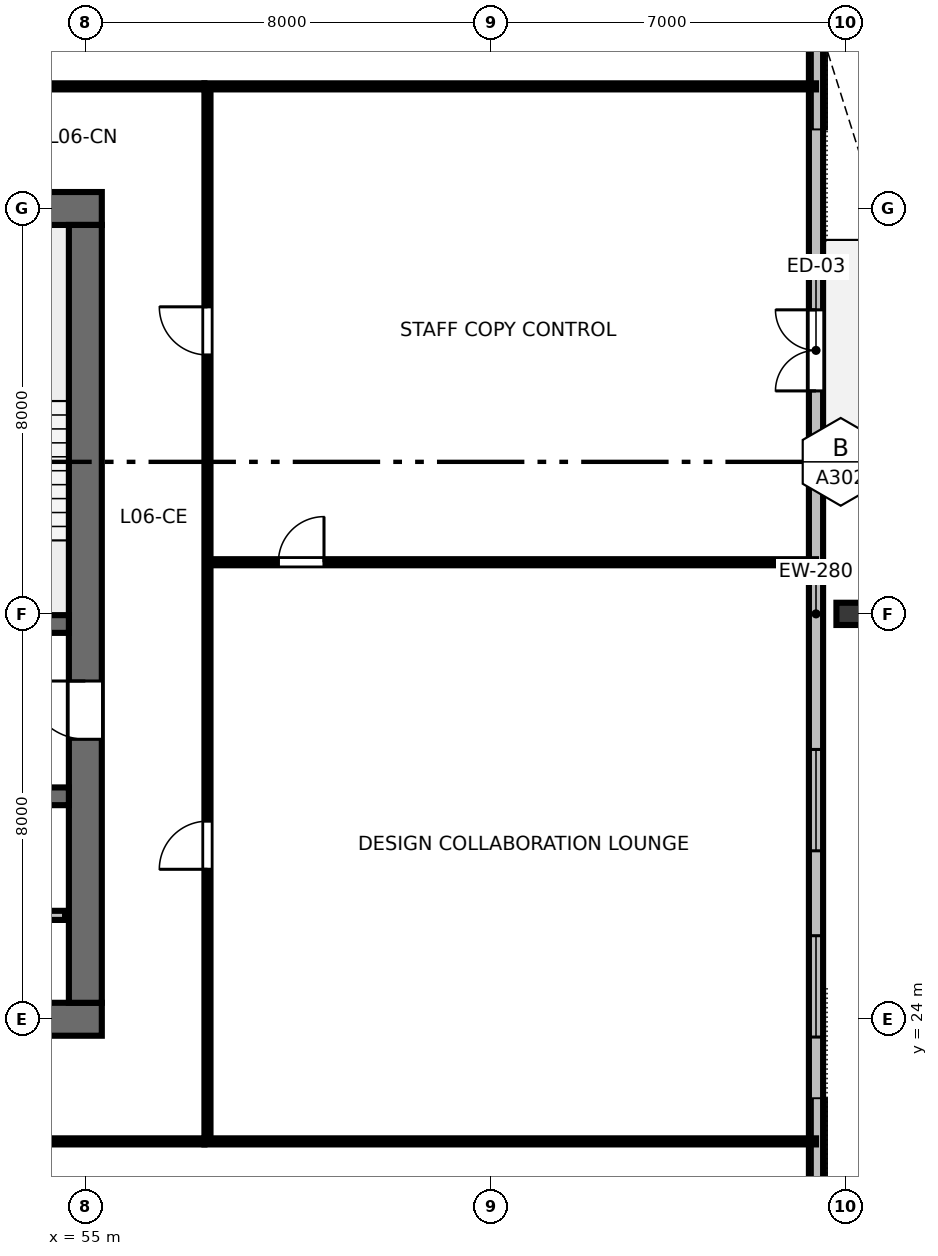
"""IFC4 building model, lengths in metres.
Left out: names, types, materials, properties, quantities, classifications, styles, units other than length and angle.
Written with IfcOpenShell. Run it as: python <this file> out.ifc"""

import sys

from ifc_helpers import new_model, si_unit, direction, frame, frame_2d, origin, origin_2d, place, context, subcontext, project, spatial, rectangle, i_section, extrude, element, fill, save


model = new_model("IFC4")
c1 = context("Model", 3, precision=1e-05, world=origin(), true_north=direction((0.0, 1.0)))
c2 = subcontext(c1, "Body", "Model", "MODEL_VIEW")
j1 = project(units=[si_unit("LENGTHUNIT", "METRE"), si_unit("PLANEANGLEUNIT", "RADIAN")], contexts=[c1])
p1 = place(None, origin())
s1 = spatial("IfcSite", under=j1, at=p1, CompositionType="ELEMENT")
p2 = place(p1, origin())
s2 = spatial("IfcBuilding", under=s1, at=p2, CompositionType="ELEMENT")
p3 = place(p2, frame((0.0, 0.0, 28.0)))
s3 = spatial("IfcBuildingStorey", under=s2, at=p3, CompositionType="ELEMENT", Elevation=28.0)
p4 = place(p3, frame((36.675, 24.0, 0.0), z_axis=(0.0, 0.0, 1.0), x_axis=(1.0, 0.0, 0.0)))
e1 = element("IfcWall", 1, at=p4, inside=s3, PredefinedType="SHEAR", context=c2, shape_type="SweptSolid", body=[
    extrude(rectangle(XDim=18.65, YDim=0.65, at=frame_2d((9.325, 0.0))), origin(), (0.0, 0.0, 1.0), 3.36),
])
p5 = place(p4, frame((5.725, 0.0, 0.0)))
e2 = element("IfcOpeningElement", 2, at=p5, cuts=e1, PredefinedType="OPENING", context=c2, shape_type="SweptSolid", body=[
    extrude(rectangle(XDim=1.6, YDim=2.15, at=frame_2d((0.8, 1.075))), frame((0.0, 0.335, 0.0), z_axis=(0.0, -1.0, 0.0), x_axis=(1.0, 0.0, 0.0)), (0.0, 0.0, 1.0), 0.67),
])
p6 = place(p4, frame((12.125, 0.0, 0.0)))
e3 = element("IfcOpeningElement", 3, at=p6, cuts=e1, PredefinedType="OPENING", context=c2, shape_type="SweptSolid", body=[
    extrude(rectangle(XDim=1.6, YDim=2.15, at=frame_2d((0.8, 1.075))), frame((0.0, 0.335, 0.0), z_axis=(0.0, -1.0, 0.0), x_axis=(1.0, 0.0, 0.0)), (0.0, 0.0, 1.0), 0.67),
])
p7 = place(p3, frame((36.675, 40.0, 0.0), z_axis=(0.0, 0.0, 1.0), x_axis=(1.0, 0.0, 0.0)))
e4 = element("IfcWall", 4, at=p7, inside=s3, PredefinedType="SHEAR", context=c2, shape_type="SweptSolid", body=[
    extrude(rectangle(XDim=18.65, YDim=0.65, at=frame_2d((9.325, 0.0))), origin(), (0.0, 0.0, 1.0), 3.36),
])
p8 = place(p7, frame((8.825, 0.0, 0.0)))
e5 = element("IfcOpeningElement", 5, at=p8, cuts=e4, PredefinedType="OPENING", context=c2, shape_type="SweptSolid", body=[
    extrude(rectangle(XDim=1.0, YDim=2.15, at=frame_2d((0.5, 1.075))), frame((0.0, 0.335, 0.0), z_axis=(0.0, -1.0, 0.0), x_axis=(1.0, 0.0, 0.0)), (0.0, 0.0, 1.0), 0.67),
])
p9 = place(p3, frame((55.0, 24.325, 0.0), z_axis=(0.0, 0.0, 1.0), x_axis=(0.0, 1.0, 0.0)))
e6 = element("IfcWall", 6, at=p9, inside=s3, PredefinedType="SHEAR", context=c2, shape_type="SweptSolid", body=[
    extrude(rectangle(XDim=15.35, YDim=0.65, at=frame_2d((7.675, 0.0))), origin(), (0.0, 0.0, 1.0), 3.36),
])
p10 = place(p9, frame((5.2, 0.0, 0.0)))
e7 = element("IfcOpeningElement", 7, at=p10, cuts=e6, PredefinedType="OPENING", context=c2, shape_type="SweptSolid", body=[
    extrude(rectangle(XDim=1.15, YDim=2.15, at=frame_2d((0.575, 1.075))), frame((0.0, 0.335, 0.0), z_axis=(0.0, -1.0, 0.0), x_axis=(1.0, 0.0, 0.0)), (0.0, 0.0, 1.0), 0.67),
])
p11 = place(p3, frame((37.325, 31.8, 0.0), z_axis=(0.0, 0.0, 1.0), x_axis=(1.0, 0.0, 0.0)))
e8 = element("IfcWall", 8, at=p11, inside=s3, PredefinedType="SHEAR", context=c2, shape_type="SweptSolid", body=[
    extrude(rectangle(XDim=17.35, YDim=0.35, at=frame_2d((8.675, 0.0))), origin(), (0.0, 0.0, 1.0), 3.36),
])
p12 = place(p11, frame((0.725, 0.0, 0.0)))
e9 = element("IfcOpeningElement", 9, at=p12, cuts=e8, PredefinedType="OPENING", context=c2, shape_type="SweptSolid", body=[
    extrude(rectangle(XDim=1.1, YDim=2.15, at=frame_2d((0.55, 1.075))), frame((0.0, 0.185, 0.0), z_axis=(0.0, -1.0, 0.0), x_axis=(1.0, 0.0, 0.0)), (0.0, 0.0, 1.0), 0.37),
])
p13 = place(p11, frame((14.625, 0.0, 0.0)))
e10 = element("IfcOpeningElement", 10, at=p13, cuts=e8, PredefinedType="OPENING", context=c2, shape_type="SweptSolid", body=[
    extrude(rectangle(XDim=1.1, YDim=2.15, at=frame_2d((0.55, 1.075))), frame((0.0, 0.185, 0.0), z_axis=(0.0, -1.0, 0.0), x_axis=(1.0, 0.0, 0.0)), (0.0, 0.0, 1.0), 0.37),
])
p14 = place(p3, frame((37.325, 28.4, 0.0), z_axis=(0.0, 0.0, 1.0), x_axis=(1.0, 0.0, 0.0)))
e11 = element("IfcWall", 11, at=p14, inside=s3, PredefinedType="SHEAR", context=c2, shape_type="SweptSolid", body=[
    extrude(rectangle(XDim=17.35, YDim=0.35, at=frame_2d((8.675, 0.0))), origin(), (0.0, 0.0, 1.0), 3.36),
])
p15 = place(p3, frame((70.08, 32.0, 0.0), z_axis=(0.0, 0.0, 1.0), x_axis=(0.0, 1.0, 0.0)))
e12 = element("IfcColumn", 12, at=p15, inside=s3, PredefinedType="COLUMN", context=c2, shape_type="SweptSolid", body=[
    extrude(i_section(OverallWidth=0.439, OverallDepth=0.514, WebThickness=0.06, FlangeThickness=0.097, FilletRadius=0.025, at=origin_2d()), origin(), (0.0, 0.0, 1.0), 3.358),
])
p16 = place(p3, frame((69.42, 14.36, 0.0), z_axis=(0.0, 0.0, 1.0), x_axis=(0.0, 1.0, 0.0)))
e13 = element("IfcWall", 13, at=p16, inside=s3, PredefinedType="STANDARD", context=c2, shape_type="SweptSolid", body=[
    extrude(rectangle(XDim=35.28, YDim=0.28, at=frame_2d((17.64, 0.0))), origin(), (0.0, 0.0, 1.0), 3.36),
])
p17 = place(p16, frame((22.04, 0.0, 0.0)))
e14 = element("IfcOpeningElement", 14, at=p17, cuts=e13, PredefinedType="OPENING", context=c2, shape_type="SweptSolid", body=[
    extrude(rectangle(XDim=1.6, YDim=2.15, at=frame_2d((0.8, 1.075))), frame((0.0, 0.15, 0.0), z_axis=(0.0, -1.0, 0.0), x_axis=(1.0, 0.0, 0.0)), (0.0, 0.0, 1.0), 0.3),
])
p18 = place(p16, frame((1.938, 0.0, 0.8)))
e15 = element("IfcOpeningElement", 15, at=p18, cuts=e13, PredefinedType="OPENING", context=c2, shape_type="SweptSolid", body=[
    extrude(rectangle(XDim=2.0, YDim=1.95, at=frame_2d((1.0, 0.975))), frame((0.0, 0.15, 0.0), z_axis=(0.0, -1.0, 0.0), x_axis=(1.0, 0.0, 0.0)), (0.0, 0.0, 1.0), 0.3),
])
p19 = place(p16, frame((9.289, 0.0, 0.8)))
e16 = element("IfcOpeningElement", 16, at=p19, cuts=e13, PredefinedType="OPENING", context=c2, shape_type="SweptSolid", body=[
    extrude(rectangle(XDim=2.0, YDim=1.95, at=frame_2d((1.0, 0.975))), frame((0.0, 0.15, 0.0), z_axis=(0.0, -1.0, 0.0), x_axis=(1.0, 0.0, 0.0)), (0.0, 0.0, 1.0), 0.3),
])
p20 = place(p16, frame((12.964, 0.0, 0.8)))
e17 = element("IfcOpeningElement", 17, at=p20, cuts=e13, PredefinedType="OPENING", context=c2, shape_type="SweptSolid", body=[
    extrude(rectangle(XDim=2.0, YDim=1.95, at=frame_2d((1.0, 0.975))), frame((0.0, 0.15, 0.0), z_axis=(0.0, -1.0, 0.0), x_axis=(1.0, 0.0, 0.0)), (0.0, 0.0, 1.0), 0.3),
])
p21 = place(p16, frame((31.342, 0.0, 0.8)))
e18 = element("IfcOpeningElement", 18, at=p21, cuts=e13, PredefinedType="OPENING", context=c2, shape_type="SweptSolid", body=[
    extrude(rectangle(XDim=2.0, YDim=1.95, at=frame_2d((1.0, 0.975))), frame((0.0, 0.15, 0.0), z_axis=(0.0, -1.0, 0.0), x_axis=(1.0, 0.0, 0.0)), (0.0, 0.0, 1.0), 0.3),
])
p22 = place(p3, frame((37.4, 26.05, 0.0), z_axis=(0.0, 0.0, 1.0), x_axis=(1.0, 0.0, 0.0)))
e19 = element("IfcWall", 19, at=p22, inside=s3, PredefinedType="PARTITIONING", context=c2, shape_type="SweptSolid", body=[
    extrude(rectangle(XDim=17.2, YDim=0.18, at=frame_2d((8.6, 0.0))), origin(), (0.0, 0.0, 1.0), 3.36),
])
p23 = place(p22, frame((1.1, 0.0, 0.0)))
e20 = element("IfcOpeningElement", 20, at=p23, cuts=e19, PredefinedType="OPENING", context=c2, shape_type="SweptSolid", body=[
    extrude(rectangle(XDim=1.05, YDim=2.15, at=frame_2d((0.525, 1.075))), frame((0.0, 0.1, 0.0), z_axis=(0.0, -1.0, 0.0), x_axis=(1.0, 0.0, 0.0)), (0.0, 0.0, 1.0), 0.2),
])
p24 = place(p22, frame((3.0, 0.0, 0.0)))
e21 = element("IfcOpeningElement", 21, at=p24, cuts=e19, PredefinedType="OPENING", context=c2, shape_type="SweptSolid", body=[
    extrude(rectangle(XDim=1.05, YDim=2.15, at=frame_2d((0.525, 1.075))), frame((0.0, 0.1, 0.0), z_axis=(0.0, -1.0, 0.0), x_axis=(1.0, 0.0, 0.0)), (0.0, 0.0, 1.0), 0.2),
])
p25 = place(p3, frame((34.65, 21.59, 0.0), z_axis=(0.0, 0.0, 1.0), x_axis=(1.0, 0.0, 0.0)))
e22 = element("IfcWall", 22, at=p25, inside=s3, PredefinedType="PARTITIONING", context=c2, shape_type="SweptSolid", body=[
    extrude(rectangle(XDim=22.7, YDim=0.12, at=frame_2d((11.35, 0.0))), origin(), (0.0, 0.0, 1.0), 2.64),
])
p26 = place(p25, frame((2.224, 0.0, 0.0)))
e23 = element("IfcOpeningElement", 23, at=p26, cuts=e22, PredefinedType="OPENING", context=c2, shape_type="SweptSolid", body=[
    extrude(rectangle(XDim=0.95, YDim=2.15, at=frame_2d((0.475, 1.075))), frame((0.0, 0.07, 0.0), z_axis=(0.0, -1.0, 0.0), x_axis=(1.0, 0.0, 0.0)), (0.0, 0.0, 1.0), 0.14),
])
p27 = place(p25, frame((9.381, 0.0, 0.0)))
e24 = element("IfcOpeningElement", 24, at=p27, cuts=e22, PredefinedType="OPENING", context=c2, shape_type="SweptSolid", body=[
    extrude(rectangle(XDim=0.95, YDim=2.15, at=frame_2d((0.475, 1.075))), frame((0.0, 0.07, 0.0), z_axis=(0.0, -1.0, 0.0), x_axis=(1.0, 0.0, 0.0)), (0.0, 0.0, 1.0), 0.14),
])
p28 = place(p25, frame((18.031, 0.0, 0.0)))
e25 = element("IfcOpeningElement", 25, at=p28, cuts=e22, PredefinedType="OPENING", context=c2, shape_type="SweptSolid", body=[
    extrude(rectangle(XDim=0.95, YDim=2.15, at=frame_2d((0.475, 1.075))), frame((0.0, 0.07, 0.0), z_axis=(0.0, -1.0, 0.0), x_axis=(1.0, 0.0, 0.0)), (0.0, 0.0, 1.0), 0.14),
])
p29 = place(p3, frame((34.65, 42.41, 0.0), z_axis=(0.0, 0.0, 1.0), x_axis=(1.0, 0.0, 0.0)))
e26 = element("IfcWall", 26, at=p29, inside=s3, PredefinedType="PARTITIONING", context=c2, shape_type="SweptSolid", body=[
    extrude(rectangle(XDim=22.7, YDim=0.12, at=frame_2d((11.35, 0.0))), origin(), (0.0, 0.0, 1.0), 2.64),
])
p30 = place(p29, frame((3.981, 0.0, 0.0)))
e27 = element("IfcOpeningElement", 27, at=p30, cuts=e26, PredefinedType="OPENING", context=c2, shape_type="SweptSolid", body=[
    extrude(rectangle(XDim=0.95, YDim=2.15, at=frame_2d((0.475, 1.075))), frame((0.0, 0.07, 0.0), z_axis=(0.0, -1.0, 0.0), x_axis=(1.0, 0.0, 0.0)), (0.0, 0.0, 1.0), 0.14),
])
p31 = place(p29, frame((10.508, 0.0, 0.0)))
e28 = element("IfcOpeningElement", 28, at=p31, cuts=e26, PredefinedType="OPENING", context=c2, shape_type="SweptSolid", body=[
    extrude(rectangle(XDim=0.95, YDim=2.15, at=frame_2d((0.475, 1.075))), frame((0.0, 0.07, 0.0), z_axis=(0.0, -1.0, 0.0), x_axis=(1.0, 0.0, 0.0)), (0.0, 0.0, 1.0), 0.14),
])
p32 = place(p29, frame((17.402, 0.0, 0.0)))
e29 = element("IfcOpeningElement", 29, at=p32, cuts=e26, PredefinedType="OPENING", context=c2, shape_type="SweptSolid", body=[
    extrude(rectangle(XDim=0.95, YDim=2.15, at=frame_2d((0.475, 1.075))), frame((0.0, 0.07, 0.0), z_axis=(0.0, -1.0, 0.0), x_axis=(1.0, 0.0, 0.0)), (0.0, 0.0, 1.0), 0.14),
])
p33 = place(p3, frame((57.41, 33.019, 0.0), z_axis=(0.0, 0.0, 1.0), x_axis=(1.0, 0.0, 0.0)))
e30 = element("IfcWall", 30, at=p33, inside=s3, PredefinedType="PARTITIONING", context=c2, shape_type="SweptSolid", body=[
    extrude(rectangle(XDim=12.01, YDim=0.12, at=frame_2d((6.005, 0.0))), origin(), (0.0, 0.0, 1.0), 2.64),
])
p34 = place(p33, frame((1.4, 0.0, 0.0)))
e31 = element("IfcOpeningElement", 31, at=p34, cuts=e30, PredefinedType="OPENING", context=c2, shape_type="SweptSolid", body=[
    extrude(rectangle(XDim=0.9, YDim=2.15, at=frame_2d((0.45, 1.075))), frame((0.0, 0.07, 0.0), z_axis=(0.0, -1.0, 0.0), x_axis=(1.0, 0.0, 0.0)), (0.0, 0.0, 1.0), 0.14),
])
p35 = place(p3, frame((57.41, 21.65, 0.0), z_axis=(0.0, 0.0, 1.0), x_axis=(0.0, 1.0, 0.0)))
e32 = element("IfcWall", 32, at=p35, inside=s3, PredefinedType="PARTITIONING", context=c2, shape_type="SweptSolid", body=[
    extrude(rectangle(XDim=20.7, YDim=0.12, at=frame_2d((10.35, 0.0))), origin(), (0.0, 0.0, 1.0), 2.64),
])
p36 = place(p35, frame((5.31, 0.0, 0.0)))
e33 = element("IfcOpeningElement", 33, at=p36, cuts=e32, PredefinedType="OPENING", context=c2, shape_type="SweptSolid", body=[
    extrude(rectangle(XDim=0.95, YDim=2.15, at=frame_2d((0.475, 1.075))), frame((0.0, 0.07, 0.0), z_axis=(0.0, -1.0, 0.0), x_axis=(1.0, 0.0, 0.0)), (0.0, 0.0, 1.0), 0.14),
])
p37 = place(p35, frame((15.459, 0.0, 0.0)))
e34 = element("IfcOpeningElement", 34, at=p37, cuts=e32, PredefinedType="OPENING", context=c2, shape_type="SweptSolid", body=[
    extrude(rectangle(XDim=0.95, YDim=2.15, at=frame_2d((0.475, 1.075))), frame((0.0, 0.07, 0.0), z_axis=(0.0, -1.0, 0.0), x_axis=(1.0, 0.0, 0.0)), (0.0, 0.0, 1.0), 0.14),
])
for number, where, z_axis, x_axis in (
    (35, (57.35, 21.59, 0.0), (0.0, 0.0, 1.0), (1.0, 0.0, 0.0)),
    (36, (57.35, 42.41, 0.0), (0.0, 0.0, 1.0), (1.0, 0.0, 0.0)),
):
    element("IfcWall", number, at=place(p3, frame(where, z_axis=z_axis, x_axis=x_axis)), inside=s3, PredefinedType="PARTITIONING", context=c2, shape_type="SweptSolid", body=[
        extrude(rectangle(XDim=12.07, YDim=0.12, at=frame_2d((6.035, 0.0))), origin(), (0.0, 0.0, 1.0), 2.64),
    ])
p38 = place(p17, origin())
e37 = element("IfcDoor", 37, at=p38, inside=s3, OperationType="DOUBLE_DOOR_SINGLE_SWING", PredefinedType="DOOR", context=c2, shape_type="SweptSolid", body=[
    extrude(rectangle(XDim=1.6, YDim=2.15, at=frame_2d((0.8, 1.075))), frame((0.0, 0.025, 0.0), z_axis=(0.0, -1.0, 0.0), x_axis=(1.0, 0.0, 0.0)), (0.0, 0.0, 1.0), 0.05),
])
fill(e14, e37)
p39 = place(p19, origin())
e38 = element("IfcWindow", 38, at=p39, inside=s3, PartitioningType="SINGLE_PANEL", PredefinedType="WINDOW", context=c2, shape_type="SweptSolid", body=[
    extrude(rectangle(XDim=2.0, YDim=1.95, at=frame_2d((1.0, 0.975))), frame((0.0, 0.03, 0.0), z_axis=(0.0, -1.0, 0.0), x_axis=(1.0, 0.0, 0.0)), (0.0, 0.0, 1.0), 0.06),
])
fill(e16, e38)
p40 = place(p20, origin())
e39 = element("IfcWindow", 39, at=p40, inside=s3, PartitioningType="SINGLE_PANEL", PredefinedType="WINDOW", context=c2, shape_type="SweptSolid", body=[
    extrude(rectangle(XDim=2.0, YDim=1.95, at=frame_2d((1.0, 0.975))), frame((0.0, 0.03, 0.0), z_axis=(0.0, -1.0, 0.0), x_axis=(1.0, 0.0, 0.0)), (0.0, 0.0, 1.0), 0.06),
])
fill(e17, e39)
p41 = place(p10, origin())
e40 = element("IfcDoor", 40, at=p41, inside=s3, OperationType="SINGLE_SWING_RIGHT", PredefinedType="DOOR", context=c2, shape_type="SweptSolid", body=[
    extrude(rectangle(XDim=1.15, YDim=2.15, at=frame_2d((0.575, 1.075))), frame((0.0, 0.025, 0.0), z_axis=(0.0, -1.0, 0.0), x_axis=(1.0, 0.0, 0.0)), (0.0, 0.0, 1.0), 0.05),
])
fill(e7, e40)
p42 = place(p34, origin())
e41 = element("IfcDoor", 41, at=p42, inside=s3, OperationType="SINGLE_SWING_RIGHT", PredefinedType="DOOR", context=c2, shape_type="SweptSolid", body=[
    extrude(rectangle(XDim=0.9, YDim=2.15, at=frame_2d((0.45, 1.075))), frame((0.0, 0.025, 0.0), z_axis=(0.0, -1.0, 0.0), x_axis=(1.0, 0.0, 0.0)), (0.0, 0.0, 1.0), 0.05),
])
fill(e31, e41)
p43 = place(p36, origin())
e42 = element("IfcDoor", 42, at=p43, inside=s3, OperationType="SINGLE_SWING_LEFT", PredefinedType="DOOR", context=c2, shape_type="SweptSolid", body=[
    extrude(rectangle(XDim=0.95, YDim=2.15, at=frame_2d((0.475, 1.075))), frame((0.0, 0.025, 0.0), z_axis=(0.0, -1.0, 0.0), x_axis=(1.0, 0.0, 0.0)), (0.0, 0.0, 1.0), 0.05),
])
fill(e33, e42)
p44 = place(p37, origin())
e43 = element("IfcDoor", 43, at=p44, inside=s3, OperationType="SINGLE_SWING_RIGHT", PredefinedType="DOOR", context=c2, shape_type="SweptSolid", body=[
    extrude(rectangle(XDim=0.95, YDim=2.15, at=frame_2d((0.475, 1.075))), frame((0.0, 0.025, 0.0), z_axis=(0.0, -1.0, 0.0), x_axis=(1.0, 0.0, 0.0)), (0.0, 0.0, 1.0), 0.05),
])
fill(e34, e43)
save(model, sys.argv[1])
